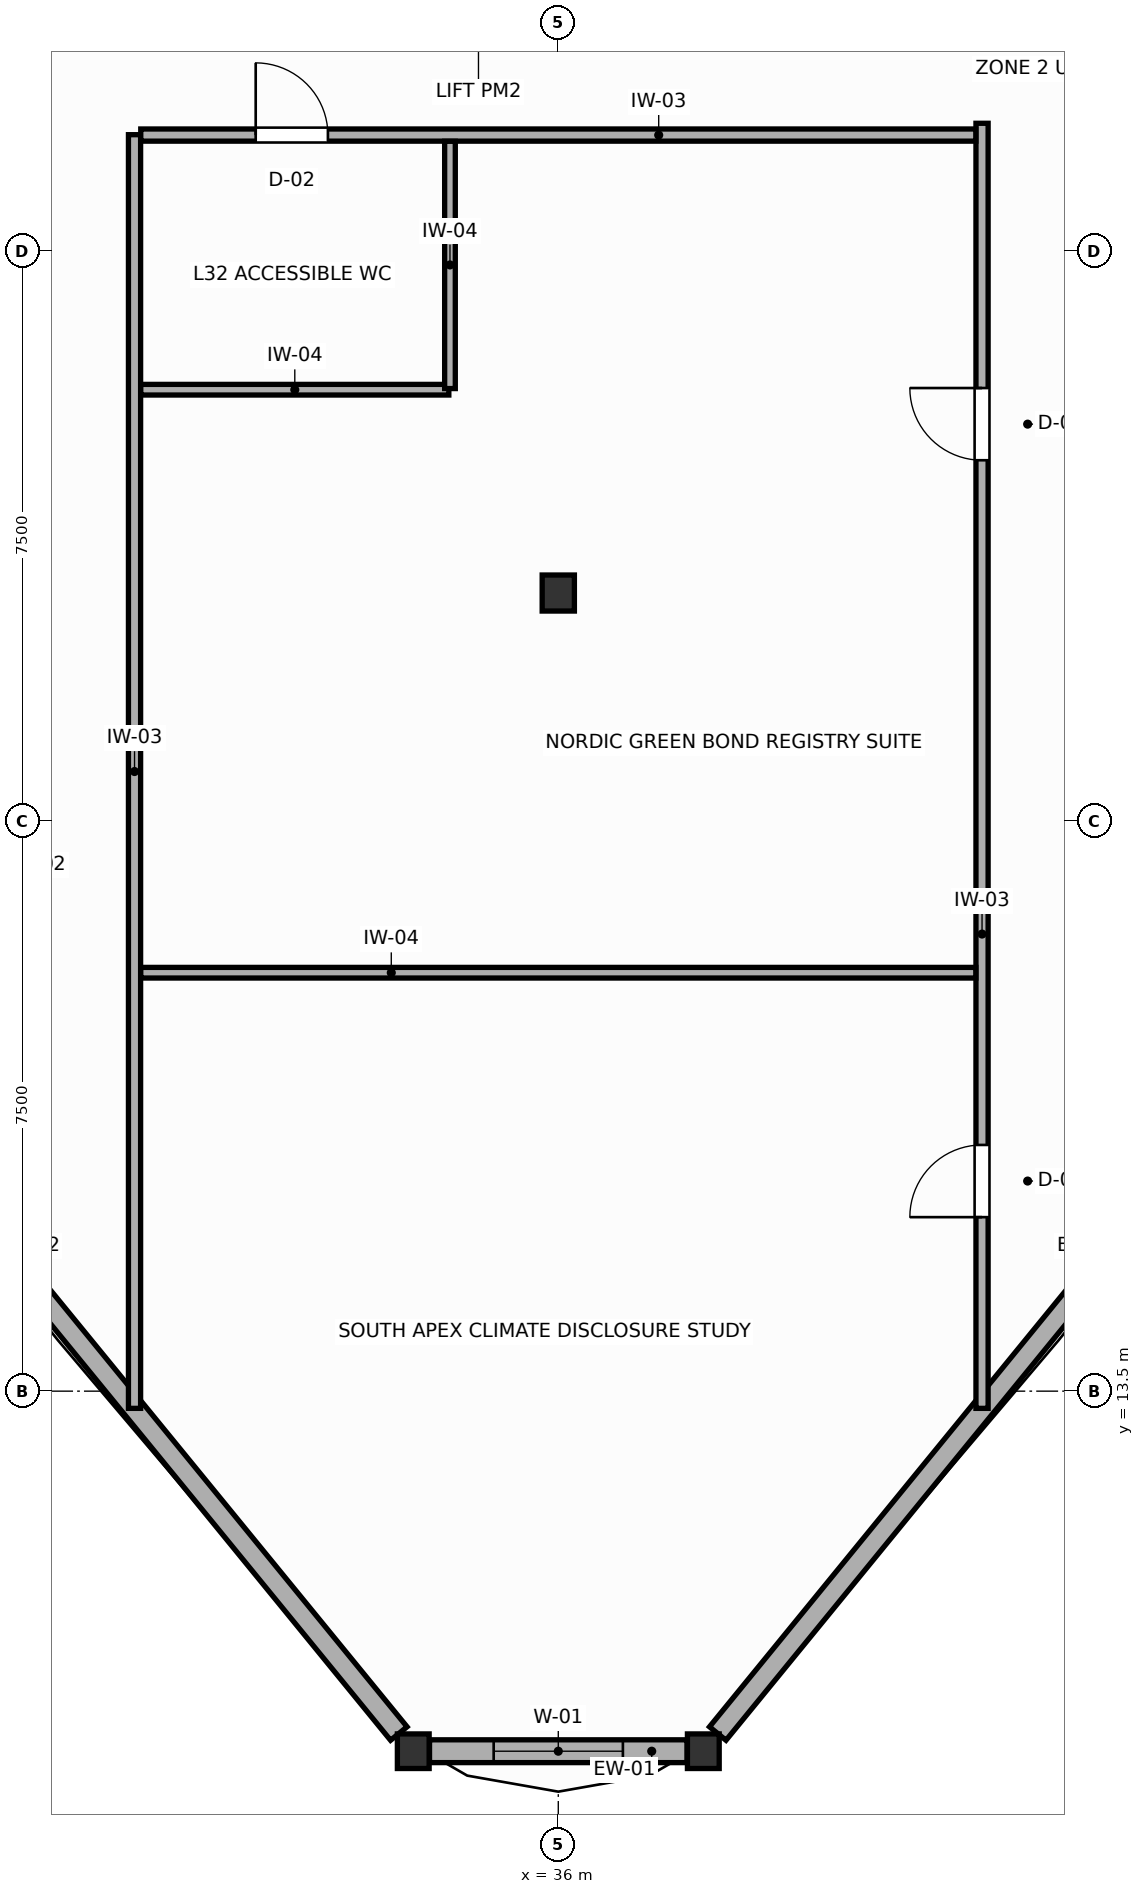
"""IFC4 building model, lengths in metres.
Left out: names, types, materials, properties, quantities, classifications, styles, units other than length and angle.
Written with IfcOpenShell. Run it as: python <this file> out.ifc"""

import sys

from ifc_helpers import new_model, si_unit, direction, frame, frame_2d, origin, origin_2d, place, context, subcontext, project, spatial, rectangle, i_section, extrude, source, transform, mapped, element, fill, save


model = new_model("IFC4")
c1 = context("Model", 3, precision=1e-05, world=origin(), true_north=direction((0.0, 1.0)))
c2 = subcontext(c1, "Body", "Model", "MODEL_VIEW")
j1 = project(units=[si_unit("LENGTHUNIT", "METRE"), si_unit("PLANEANGLEUNIT", "RADIAN")], contexts=[c1])
p1 = place(None, origin())
s1 = spatial("IfcSite", under=j1, at=p1, CompositionType="ELEMENT")
p2 = place(p1, origin())
s2 = spatial("IfcBuilding", under=s1, at=p2, CompositionType="ELEMENT")
p3 = place(p2, frame((0.0, 0.0, 127.8)))
s3 = spatial("IfcBuildingStorey", under=s2, at=p3, CompositionType="ELEMENT", Elevation=127.8)
m1 = source(origin(), c2, "Body", "SweptSolid", [
    extrude(i_section(OverallWidth=0.424, OverallDepth=0.474, WebThickness=0.045, FlangeThickness=0.072, FilletRadius=0.015, at=origin_2d()), origin(), (0.0, 0.0, 1.0), 3.6),
])
p4 = place(p3, frame((36.0, 24.0, 0.0), z_axis=(0.0, 0.0, 1.0), x_axis=(1.0, 0.0, 0.0)))
e1 = element("IfcColumn", 1, at=p4, inside=s3, PredefinedType="COLUMN", context=c2, shape_type="MappedRepresentation", body=[
    mapped(m1, transform((0.0, 0.0, 0.0), scale=1.0)),
])
m2 = source(origin(), c2, "Body", "SweptSolid", [
    extrude(i_section(OverallWidth=0.418, OverallDepth=0.455, WebThickness=0.039, FlangeThickness=0.063, FilletRadius=0.015, at=origin_2d()), origin(), (0.0, 0.0, 1.0), 3.6),
])
for number, where, z_axis, x_axis in (
    (2, (34.092, 8.763, 0.0), (0.0, 0.0, 1.0), (1.0, 0.0, 0.0)),
    (3, (37.908, 8.763, 0.0), (0.0, 0.0, 1.0), (1.0, 0.0, 0.0)),
):
    element("IfcColumn", number, at=place(p3, frame(where, z_axis=z_axis, x_axis=x_axis)), inside=s3, PredefinedType="COLUMN", context=c2, shape_type="MappedRepresentation", body=[
        mapped(m2, transform((0.0, 0.0, 0.0), scale=1.0)),
    ])
p5 = place(p3, frame((24.152, 20.935, 0.0), z_axis=(0.0, 0.0, 1.0), x_axis=(0.632511291832, -0.774551138211, 0.0)))
e4 = element("IfcWall", 4, at=p5, inside=s3, PredefinedType="SOLIDWALL", context=c2, shape_type="SweptSolid", body=[
    extrude(rectangle(XDim=15.414, YDim=0.28, at=frame_2d((7.707, 0.0))), origin(), (0.0, 0.0, 1.0), 2.86),
])
p6 = place(p3, frame((34.306, 8.763, 0.0), z_axis=(0.0, 0.0, 1.0), x_axis=(1.0, 0.0, 0.0)))
e5 = element("IfcWall", 5, at=p6, inside=s3, PredefinedType="SOLIDWALL", context=c2, shape_type="SweptSolid", body=[
    extrude(rectangle(XDim=3.388, YDim=0.3, at=frame_2d((1.694, 0.0))), origin(), (0.0, 0.0, 1.0), 2.86),
])
p7 = place(p6, frame((0.844, 0.0, 0.75)))
e6 = element("IfcOpeningElement", 6, at=p7, cuts=e5, PredefinedType="OPENING", context=c2, shape_type="SweptSolid", body=[
    extrude(rectangle(XDim=1.7, YDim=1.75, at=frame_2d((0.85, 0.875))), frame((0.0, 0.16, 0.0), z_axis=(0.0, -1.0, 0.0), x_axis=(1.0, 0.0, 0.0)), (0.0, 0.0, 1.0), 0.32),
])
p8 = place(p3, frame((38.098, 8.996, 0.0), z_axis=(0.0, 0.0, 1.0), x_axis=(0.632511291832, 0.774551138211, 0.0)))
e7 = element("IfcWall", 7, at=p8, inside=s3, PredefinedType="SOLIDWALL", context=c2, shape_type="SweptSolid", body=[
    extrude(rectangle(XDim=15.414, YDim=0.28, at=frame_2d((7.707, 0.0))), origin(), (0.0, 0.0, 1.0), 2.86),
])
p9 = place(p3, frame((41.575, 13.274, 0.0), z_axis=(0.0, 0.0, 1.0), x_axis=(0.0, 1.0, 0.0)))
e8 = element("IfcWall", 8, at=p9, inside=s3, PredefinedType="PARTITIONING", context=c2, shape_type="SweptSolid", body=[
    extrude(rectangle(XDim=16.906, YDim=0.16, at=frame_2d((8.453, 0.0))), origin(), (0.0, 0.0, 1.0), 3.26),
])
p10 = place(p9, frame((2.516, 0.0, 0.0)))
e9 = element("IfcOpeningElement", 9, at=p10, cuts=e8, PredefinedType="OPENING", context=c2, shape_type="SweptSolid", body=[
    extrude(rectangle(XDim=0.95, YDim=2.05, at=frame_2d((0.475, 1.025))), frame((0.0, 0.09, 0.0), z_axis=(0.0, -1.0, 0.0), x_axis=(1.0, 0.0, 0.0)), (0.0, 0.0, 1.0), 0.18),
])
p11 = place(p9, frame((12.473, 0.0, 0.0)))
e10 = element("IfcOpeningElement", 10, at=p11, cuts=e8, PredefinedType="OPENING", context=c2, shape_type="SweptSolid", body=[
    extrude(rectangle(XDim=0.95, YDim=2.05, at=frame_2d((0.475, 1.025))), frame((0.0, 0.09, 0.0), z_axis=(0.0, -1.0, 0.0), x_axis=(1.0, 0.0, 0.0)), (0.0, 0.0, 1.0), 0.18),
])
p12 = place(p3, frame((30.425, 13.274, 0.0), z_axis=(0.0, 0.0, 1.0), x_axis=(0.0, 1.0, 0.0)))
e11 = element("IfcWall", 11, at=p12, inside=s3, PredefinedType="PARTITIONING", context=c2, shape_type="SweptSolid", body=[
    extrude(rectangle(XDim=16.756, YDim=0.16, at=frame_2d((8.378, 0.0))), origin(), (0.0, 0.0, 1.0), 3.26),
])
p13 = place(p3, frame((30.507, 30.025, 0.0), z_axis=(0.0, 0.0, 1.0), x_axis=(1.0, 0.0, 0.0)))
e12 = element("IfcWall", 12, at=p13, inside=s3, PredefinedType="PARTITIONING", context=c2, shape_type="SweptSolid", body=[
    extrude(rectangle(XDim=10.986, YDim=0.16, at=frame_2d((5.493, 0.0))), origin(), (0.0, 0.0, 1.0), 3.26),
])
p14 = place(p13, frame((1.512, 0.0, 0.0)))
e13 = element("IfcOpeningElement", 13, at=p14, cuts=e12, PredefinedType="OPENING", context=c2, shape_type="SweptSolid", body=[
    extrude(rectangle(XDim=0.95, YDim=2.05, at=frame_2d((0.475, 1.025))), frame((0.0, 0.09, 0.0), z_axis=(0.0, -1.0, 0.0), x_axis=(1.0, 0.0, 0.0)), (0.0, 0.0, 1.0), 0.18),
])
p15 = place(p3, frame((30.507, 19.005, 0.0), z_axis=(0.0, 0.0, 1.0), x_axis=(1.0, 0.0, 0.0)))
e14 = element("IfcWall", 14, at=p15, inside=s3, PredefinedType="PARTITIONING", context=c2, shape_type="SweptSolid", body=[
    extrude(rectangle(XDim=10.986, YDim=0.14, at=frame_2d((5.493, 0.0))), origin(), (0.0, 0.0, 1.0), 3.26),
])
p16 = place(p3, frame((30.507, 26.675, 0.0), z_axis=(0.0, 0.0, 1.0), x_axis=(1.0, 0.0, 0.0)))
e15 = element("IfcWall", 15, at=p16, inside=s3, PredefinedType="PARTITIONING", context=c2, shape_type="SweptSolid", body=[
    extrude(rectangle(XDim=4.053, YDim=0.14, at=frame_2d((2.026, 0.0))), origin(), (0.0, 0.0, 1.0), 3.26),
])
p17 = place(p3, frame((34.575, 26.69, 0.0), z_axis=(0.0, 0.0, 1.0), x_axis=(0.0, 1.0, 0.0)))
e16 = element("IfcWall", 16, at=p17, inside=s3, PredefinedType="PARTITIONING", context=c2, shape_type="SweptSolid", body=[
    extrude(rectangle(XDim=3.253, YDim=0.14, at=frame_2d((1.626, 0.0))), origin(), (0.0, 0.0, 1.0), 3.26),
])
p18 = place(p7, origin())
e17 = element("IfcWindow", 17, at=p18, inside=s3, PartitioningType="SINGLE_PANEL", PredefinedType="WINDOW", context=c2, shape_type="SweptSolid", body=[
    extrude(rectangle(XDim=1.7, YDim=1.75, at=frame_2d((0.85, 0.875))), frame((0.0, 0.03, 0.0), z_axis=(0.0, -1.0, 0.0), x_axis=(1.0, 0.0, 0.0)), (0.0, 0.0, 1.0), 0.06),
])
fill(e6, e17)
p19 = place(p10, origin())
e18 = element("IfcDoor", 18, at=p19, inside=s3, OperationType="SINGLE_SWING_LEFT", PredefinedType="DOOR", context=c2, shape_type="SweptSolid", body=[
    extrude(rectangle(XDim=0.95, YDim=2.05, at=frame_2d((0.475, 1.025))), frame((0.0, 0.025, 0.0), z_axis=(0.0, -1.0, 0.0), x_axis=(1.0, 0.0, 0.0)), (0.0, 0.0, 1.0), 0.05),
])
fill(e9, e18)
p20 = place(p11, origin())
e19 = element("IfcDoor", 19, at=p20, inside=s3, OperationType="SINGLE_SWING_RIGHT", PredefinedType="DOOR", context=c2, shape_type="SweptSolid", body=[
    extrude(rectangle(XDim=0.95, YDim=2.05, at=frame_2d((0.475, 1.025))), frame((0.0, 0.025, 0.0), z_axis=(0.0, -1.0, 0.0), x_axis=(1.0, 0.0, 0.0)), (0.0, 0.0, 1.0), 0.05),
])
fill(e10, e19)
p21 = place(p14, origin())
e20 = element("IfcDoor", 20, at=p21, inside=s3, OperationType="SINGLE_SWING_LEFT", PredefinedType="DOOR", context=c2, shape_type="SweptSolid", body=[
    extrude(rectangle(XDim=0.95, YDim=2.05, at=frame_2d((0.475, 1.025))), frame((0.0, 0.025, 0.0), z_axis=(0.0, -1.0, 0.0), x_axis=(1.0, 0.0, 0.0)), (0.0, 0.0, 1.0), 0.05),
])
fill(e13, e20)
save(model, sys.argv[1])
